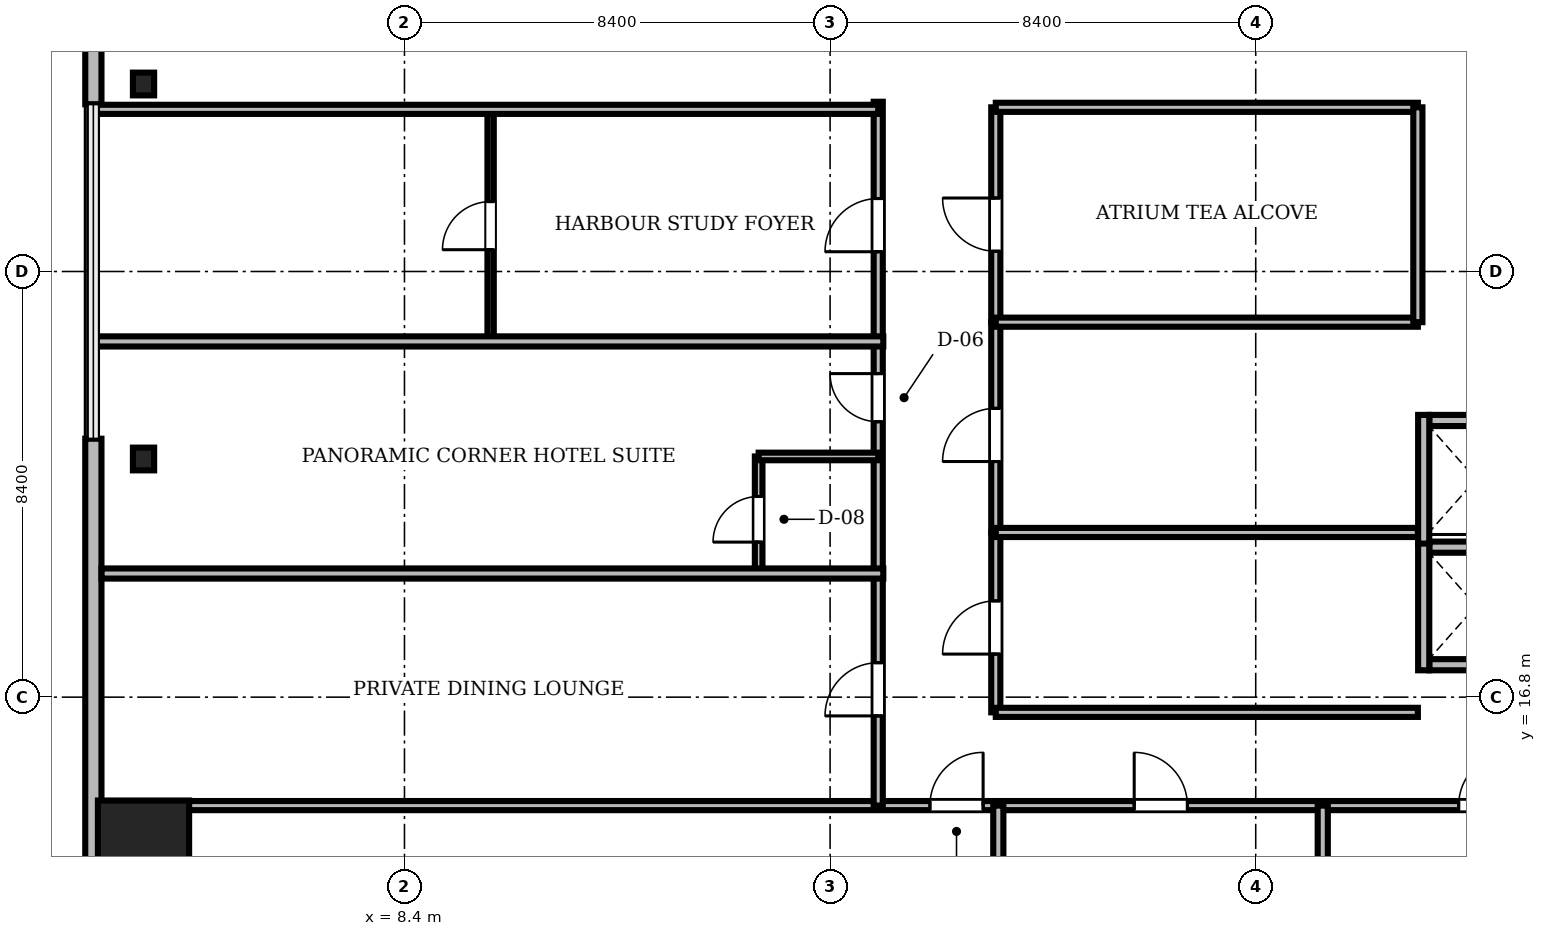
"""IFC4 building model, lengths in metres.
Left out: names, types, materials, properties, quantities, classifications, styles, units other than length and angle.
Written with IfcOpenShell. Run it as: python <this file> out.ifc"""

import sys

from ifc_helpers import new_model, si_unit, direction, frame, frame_2d, origin, origin_2d, place, context, subcontext, project, spatial, rectangle, i_section, extrude, source, transform, mapped, element, fill, save


model = new_model("IFC4")
c1 = context("Model", 3, precision=1e-05, world=origin(), true_north=direction((0.0, 1.0)))
c2 = subcontext(c1, "Body", "Model", "MODEL_VIEW")
j1 = project(units=[si_unit("LENGTHUNIT", "METRE"), si_unit("PLANEANGLEUNIT", "RADIAN")], contexts=[c1])
p1 = place(None, origin())
s1 = spatial("IfcSite", under=j1, at=p1, CompositionType="ELEMENT")
p2 = place(p1, origin())
s2 = spatial("IfcBuilding", under=s1, at=p2, CompositionType="ELEMENT")
p3 = place(p2, frame((0.0, 0.0, 34.9)))
s3 = spatial("IfcBuildingStorey", under=s2, at=p3, CompositionType="ELEMENT", Elevation=34.9)
m1 = source(origin(), c2, "Body", "SweptSolid", [
    extrude(rectangle(XDim=1.8, YDim=1.8, at=origin_2d()), origin(), (0.0, 0.0, 1.0), 3.41),
])
p4 = place(p3, frame((3.25, 13.86, 0.0), z_axis=(0.0, 0.0, 1.0), x_axis=(1.0, 0.0, 0.0)))
e1 = element("IfcColumn", 1, at=p4, inside=s3, PredefinedType="COLUMN", context=c2, shape_type="MappedRepresentation", body=[
    mapped(m1, transform((0.0, 0.0, 0.0), scale=1.0)),
])
m2 = source(origin(), c2, "Body", "SweptSolid", [
    extrude(i_section(OverallWidth=0.419, OverallDepth=0.449, WebThickness=0.031, FlangeThickness=0.048, FilletRadius=0.015, at=origin_2d()), origin(), (0.0, 0.0, 1.0), 3.41),
])
for number, where, z_axis, x_axis in (
    (2, (3.25, 28.9, 0.0), (0.0, 0.0, 1.0), (1.0, 0.0, 0.0)),
    (3, (3.25, 21.5, 0.0), (0.0, 0.0, 1.0), (1.0, 0.0, 0.0)),
):
    element("IfcColumn", number, at=place(p3, frame(where, z_axis=z_axis, x_axis=x_axis)), inside=s3, PredefinedType="COLUMN", context=c2, shape_type="MappedRepresentation", body=[
        mapped(m2, transform((0.0, 0.0, 0.0), scale=1.0)),
    ])
m3 = source(origin(), c2, "Body", "SweptSolid", [
    extrude(rectangle(XDim=15.6, YDim=0.32, at=frame_2d((7.8, 0.0))), origin(), (0.0, 0.0, 1.0), 3.41),
])
p5 = place(p3, frame((2.26, 44.1, 0.0), z_axis=(0.0, 0.0, 1.0), x_axis=(0.0, -1.0, 0.0)))
e4 = element("IfcWall", 4, at=p5, inside=s3, PredefinedType="SOLIDWALL", context=c2, shape_type="MappedRepresentation", body=[
    mapped(m3, transform((0.0, 0.0, 0.0), scale=1.0)),
])
m4 = source(origin(), c2, "Body", "SweptSolid", [
    extrude(rectangle(XDim=1.4, YDim=2.3, at=frame_2d((0.7, 1.15))), frame((0.0, 0.17, 0.0), z_axis=(0.0, -1.0, 0.0), x_axis=(1.0, 0.0, 0.0)), (0.0, 0.0, 1.0), 0.34),
])
p6 = place(p5, frame((9.61, 0.0, 0.0)))
e5 = element("IfcOpeningElement", 5, at=p6, cuts=e4, PredefinedType="OPENING", context=c2, shape_type="MappedRepresentation", body=[
    mapped(m4, transform((0.0, 0.0, 0.0), scale=1.0)),
])
m5 = source(origin(), c2, "Body", "SweptSolid", [
    extrude(rectangle(XDim=2.8, YDim=2.4, at=frame_2d((1.4, 1.2))), frame((0.0, 0.17, 0.0), z_axis=(0.0, -1.0, 0.0), x_axis=(1.0, 0.0, 0.0)), (0.0, 0.0, 1.0), 0.34),
])
p7 = place(p5, frame((2.705, 0.0, 0.72)))
e6 = element("IfcOpeningElement", 6, at=p7, cuts=e4, PredefinedType="OPENING", context=c2, shape_type="MappedRepresentation", body=[
    mapped(m5, transform((0.0, 0.0, 0.0), scale=1.0)),
])
m6 = source(origin(), c2, "Body", "SweptSolid", [
    extrude(rectangle(XDim=15.6, YDim=0.32, at=frame_2d((7.8, 0.0))), origin(), (0.0, 0.0, 1.0), 3.41),
])
p8 = place(p3, frame((2.26, 21.9, 0.0), z_axis=(0.0, 0.0, 1.0), x_axis=(0.0, -1.0, 0.0)))
e7 = element("IfcWall", 7, at=p8, inside=s3, PredefinedType="SOLIDWALL", context=c2, shape_type="MappedRepresentation", body=[
    mapped(m6, transform((0.0, 0.0, 0.0), scale=1.0)),
])
p9 = place(p8, frame((10.095, 0.0, 0.72)))
e8 = element("IfcOpeningElement", 8, at=p9, cuts=e7, PredefinedType="OPENING", context=c2, shape_type="MappedRepresentation", body=[
    mapped(m5, transform((0.0, 0.0, 0.0), scale=1.0)),
])
m7 = source(origin(), c2, "Body", "SweptSolid", [
    extrude(rectangle(XDim=1.85, YDim=0.22, at=frame_2d((0.925, 0.0))), origin(), (0.0, 0.0, 1.0), 3.41),
])
for number, where, z_axis, x_axis in (
    (9, (28.625, 17.44, 0.0), (0.0, 0.0, 1.0), (1.0, 0.0, 0.0)),
    (10, (28.625, 19.76, 0.0), (0.0, 0.0, 1.0), (1.0, 0.0, 0.0)),
):
    element("IfcWall", number, at=place(p3, frame(where, z_axis=z_axis, x_axis=x_axis)), inside=s3, PredefinedType="SOLIDWALL", context=c2, shape_type="MappedRepresentation", body=[
        mapped(m7, transform((0.0, 0.0, 0.0), scale=1.0)),
    ])
m8 = source(origin(), c2, "Body", "SweptSolid", [
    extrude(rectangle(XDim=2.54, YDim=0.22, at=frame_2d((1.27, 0.0))), origin(), (0.0, 0.0, 1.0), 3.41),
])
p10 = place(p3, frame((28.515, 17.33, 0.0), z_axis=(0.0, 0.0, 1.0), x_axis=(0.0, 1.0, 0.0)))
e11 = element("IfcWall", 11, at=p10, inside=s3, PredefinedType="SOLIDWALL", context=c2, shape_type="MappedRepresentation", body=[
    mapped(m8, transform((0.0, 0.0, 0.0), scale=1.0)),
])
p11 = place(p3, frame((28.625, 22.26, 0.0), z_axis=(0.0, 0.0, 1.0), x_axis=(1.0, 0.0, 0.0)))
e12 = element("IfcWall", 12, at=p11, inside=s3, PredefinedType="SOLIDWALL", context=c2, shape_type="MappedRepresentation", body=[
    mapped(m7, transform((0.0, 0.0, 0.0), scale=1.0)),
])
p12 = place(p3, frame((28.515, 19.83, 0.0), z_axis=(0.0, 0.0, 1.0), x_axis=(0.0, 1.0, 0.0)))
e13 = element("IfcWall", 13, at=p12, inside=s3, PredefinedType="SOLIDWALL", context=c2, shape_type="MappedRepresentation", body=[
    mapped(m8, transform((0.0, 0.0, 0.0), scale=1.0)),
])
m9 = source(origin(), c2, "Body", "SweptSolid", [
    extrude(rectangle(XDim=46.156, YDim=0.18, at=frame_2d((23.078, 0.0))), origin(), (0.0, 0.0, 1.0), 2.652),
])
p13 = place(p3, frame((2.422, 14.66, 0.0), z_axis=(0.0, 0.0, 1.0), x_axis=(1.0, 0.0, 0.0)))
e14 = element("IfcWall", 14, at=p13, inside=s3, PredefinedType="PARTITIONING", context=c2, shape_type="MappedRepresentation", body=[
    mapped(m9, transform((0.0, 0.0, 0.0), scale=1.0)),
])
m10 = source(origin(), c2, "Body", "SweptSolid", [
    extrude(rectangle(XDim=1.05, YDim=2.2, at=frame_2d((0.525, 1.1))), frame((0.0, 0.1, 0.0), z_axis=(0.0, -1.0, 0.0), x_axis=(1.0, 0.0, 0.0)), (0.0, 0.0, 1.0), 0.2),
])
p14 = place(p13, frame((16.348, 0.0, 0.0)))
e15 = element("IfcOpeningElement", 15, at=p14, cuts=e14, PredefinedType="OPENING", context=c2, shape_type="MappedRepresentation", body=[
    mapped(m10, transform((0.0, 0.0, 0.0), scale=1.0)),
])
p15 = place(p13, frame((20.38, 0.0, 0.0)))
e16 = element("IfcOpeningElement", 16, at=p15, cuts=e14, PredefinedType="OPENING", context=c2, shape_type="MappedRepresentation", body=[
    mapped(m10, transform((0.0, 0.0, 0.0), scale=1.0)),
])
p16 = place(p13, frame((26.783, 0.0, 0.0)))
e17 = element("IfcOpeningElement", 17, at=p16, cuts=e14, PredefinedType="OPENING", context=c2, shape_type="MappedRepresentation", body=[
    mapped(m10, transform((0.0, 0.0, 0.0), scale=1.0)),
])
p17 = place(p13, frame((33.186, 0.0, 0.0)))
e18 = element("IfcOpeningElement", 18, at=p17, cuts=e14, PredefinedType="OPENING", context=c2, shape_type="MappedRepresentation", body=[
    mapped(m10, transform((0.0, 0.0, 0.0), scale=1.0)),
])
p18 = place(p13, frame((40.998, 0.0, 0.0)))
e19 = element("IfcOpeningElement", 19, at=p18, cuts=e14, PredefinedType="OPENING", context=c2, shape_type="MappedRepresentation", body=[
    mapped(m10, transform((0.0, 0.0, 0.0), scale=1.0)),
])
m11 = source(origin(), c2, "Body", "SweptSolid", [
    extrude(rectangle(XDim=13.89, YDim=0.18, at=frame_2d((6.945, 0.0))), origin(), (0.0, 0.0, 1.0), 2.802),
])
p19 = place(p3, frame((17.75, 14.66, 0.0), z_axis=(0.0, 0.0, 1.0), x_axis=(0.0, 1.0, 0.0)))
e20 = element("IfcWall", 20, at=p19, inside=s3, PredefinedType="PARTITIONING", context=c2, shape_type="MappedRepresentation", body=[
    mapped(m11, transform((0.0, 0.0, 0.0), scale=1.0)),
])
p20 = place(p19, frame((1.77, 0.0, 0.0)))
e21 = element("IfcOpeningElement", 21, at=p20, cuts=e20, PredefinedType="OPENING", context=c2, shape_type="MappedRepresentation", body=[
    mapped(m10, transform((0.0, 0.0, 0.0), scale=1.0)),
])
m12 = source(origin(), c2, "Body", "SweptSolid", [
    extrude(rectangle(XDim=0.95, YDim=2.15, at=frame_2d((0.475, 1.075))), frame((0.0, 0.1, 0.0), z_axis=(0.0, -1.0, 0.0), x_axis=(1.0, 0.0, 0.0)), (0.0, 0.0, 1.0), 0.2),
])
p21 = place(p19, frame((7.575, 0.0, 0.0)))
e22 = element("IfcOpeningElement", 22, at=p21, cuts=e20, PredefinedType="OPENING", context=c2, shape_type="MappedRepresentation", body=[
    mapped(m12, transform((0.0, 0.0, 0.0), scale=1.0)),
])
p22 = place(p19, frame((10.93, 0.0, 0.0)))
e23 = element("IfcOpeningElement", 23, at=p22, cuts=e20, PredefinedType="OPENING", context=c2, shape_type="MappedRepresentation", body=[
    mapped(m10, transform((0.0, 0.0, 0.0), scale=1.0)),
])
m13 = source(origin(), c2, "Body", "SweptSolid", [
    extrude(rectangle(XDim=4.58, YDim=0.125, at=frame_2d((2.29, 0.0))), origin(), (0.0, 0.0, 1.0), 2.802),
])
p23 = place(p3, frame((10.1, 23.82, 0.0), z_axis=(0.0, 0.0, 1.0), x_axis=(0.0, 1.0, 0.0)))
e24 = element("IfcWall", 24, at=p23, inside=s3, PredefinedType="PARTITIONING", context=c2, shape_type="MappedRepresentation", body=[
    mapped(m13, transform((0.0, 0.0, 0.0), scale=1.0)),
])
m14 = source(origin(), c2, "Body", "SweptSolid", [
    extrude(rectangle(XDim=0.95, YDim=2.15, at=frame_2d((0.475, 1.075))), frame((0.0, 0.073, 0.0), z_axis=(0.0, -1.0, 0.0), x_axis=(1.0, 0.0, 0.0)), (0.0, 0.0, 1.0), 0.145),
])
p24 = place(p23, frame((1.81, 0.0, 0.0)))
e25 = element("IfcOpeningElement", 25, at=p24, cuts=e24, PredefinedType="OPENING", context=c2, shape_type="MappedRepresentation", body=[
    mapped(m14, transform((0.0, 0.0, 0.0), scale=1.0)),
])
m15 = source(origin(), c2, "Body", "SweptSolid", [
    extrude(rectangle(XDim=4.24, YDim=0.18, at=frame_2d((2.12, 0.0))), origin(), (0.0, 0.0, 1.0), 2.802),
])
p25 = place(p3, frame((20.07, 24.2, 0.0), z_axis=(0.0, 0.0, 1.0), x_axis=(0.0, 1.0, 0.0)))
e26 = element("IfcWall", 26, at=p25, inside=s3, PredefinedType="PARTITIONING", context=c2, shape_type="MappedRepresentation", body=[
    mapped(m15, transform((0.0, 0.0, 0.0), scale=1.0)),
])
p26 = place(p25, frame((1.4, 0.0, 0.0)))
e27 = element("IfcOpeningElement", 27, at=p26, cuts=e26, PredefinedType="OPENING", context=c2, shape_type="MappedRepresentation", body=[
    mapped(m10, transform((0.0, 0.0, 0.0), scale=1.0)),
])
m16 = source(origin(), c2, "Body", "SweptSolid", [
    extrude(rectangle(XDim=4.15, YDim=0.18, at=frame_2d((2.075, 0.0))), origin(), (0.0, 0.0, 1.0), 3.042),
])
p27 = place(p3, frame((20.07, 20.05, 0.0), z_axis=(0.0, 0.0, 1.0), x_axis=(0.0, 1.0, 0.0)))
e28 = element("IfcWall", 28, at=p27, inside=s3, PredefinedType="PARTITIONING", context=c2, shape_type="MappedRepresentation", body=[
    mapped(m16, transform((0.0, 0.0, 0.0), scale=1.0)),
])
p28 = place(p27, frame((1.4, 0.0, 0.0)))
e29 = element("IfcOpeningElement", 29, at=p28, cuts=e28, PredefinedType="OPENING", context=c2, shape_type="MappedRepresentation", body=[
    mapped(m10, transform((0.0, 0.0, 0.0), scale=1.0)),
])
m17 = source(origin(), c2, "Body", "SweptSolid", [
    extrude(rectangle(XDim=3.55, YDim=0.18, at=frame_2d((1.775, 0.0))), origin(), (0.0, 0.0, 1.0), 2.802),
])
p29 = place(p3, frame((20.07, 16.5, 0.0), z_axis=(0.0, 0.0, 1.0), x_axis=(0.0, 1.0, 0.0)))
e30 = element("IfcWall", 30, at=p29, inside=s3, PredefinedType="PARTITIONING", context=c2, shape_type="MappedRepresentation", body=[
    mapped(m17, transform((0.0, 0.0, 0.0), scale=1.0)),
])
p30 = place(p29, frame((1.15, 0.0, 0.0)))
e31 = element("IfcOpeningElement", 31, at=p30, cuts=e30, PredefinedType="OPENING", context=c2, shape_type="MappedRepresentation", body=[
    mapped(m10, transform((0.0, 0.0, 0.0), scale=1.0)),
])
m18 = source(origin(), c2, "Body", "SweptSolid", [
    extrude(rectangle(XDim=2.29, YDim=0.15, at=frame_2d((1.145, 0.0))), origin(), (0.0, 0.0, 1.0), 2.802),
])
p31 = place(p3, frame((15.39, 19.26, 0.0), z_axis=(0.0, 0.0, 1.0), x_axis=(0.0, 1.0, 0.0)))
e32 = element("IfcWall", 32, at=p31, inside=s3, PredefinedType="PARTITIONING", context=c2, shape_type="MappedRepresentation", body=[
    mapped(m18, transform((0.0, 0.0, 0.0), scale=1.0)),
])
m19 = source(origin(), c2, "Body", "SweptSolid", [
    extrude(rectangle(XDim=0.9, YDim=2.1, at=frame_2d((0.45, 1.05))), frame((0.0, 0.085, 0.0), z_axis=(0.0, -1.0, 0.0), x_axis=(1.0, 0.0, 0.0)), (0.0, 0.0, 1.0), 0.17),
])
p32 = place(p31, frame((0.6, 0.0, 0.0)))
e33 = element("IfcOpeningElement", 33, at=p32, cuts=e32, PredefinedType="OPENING", context=c2, shape_type="MappedRepresentation", body=[
    mapped(m19, transform((0.0, 0.0, 0.0), scale=1.0)),
])
m20 = source(origin(), c2, "Body", "SweptSolid", [
    extrude(rectangle(XDim=15.428, YDim=0.2, at=frame_2d((7.714, 0.0))), origin(), (0.0, 0.0, 1.0), 2.652),
])
p33 = place(p3, frame((2.422, 19.24, 0.0), z_axis=(0.0, 0.0, 1.0), x_axis=(1.0, 0.0, 0.0)))
e34 = element("IfcWall", 34, at=p33, inside=s3, PredefinedType="PARTITIONING", context=c2, shape_type="MappedRepresentation", body=[
    mapped(m20, transform((0.0, 0.0, 0.0), scale=1.0)),
])
m21 = source(origin(), c2, "Body", "SweptSolid", [
    extrude(rectangle(XDim=15.62, YDim=0.2, at=frame_2d((7.81, 0.0))), origin(), (0.0, 0.0, 1.0), 2.652),
])
p34 = place(p3, frame((2.23, 23.82, 0.0), z_axis=(0.0, 0.0, 1.0), x_axis=(1.0, 0.0, 0.0)))
e35 = element("IfcWall", 35, at=p34, inside=s3, PredefinedType="PARTITIONING", context=c2, shape_type="MappedRepresentation", body=[
    mapped(m21, transform((0.0, 0.0, 0.0), scale=1.0)),
])
m22 = source(origin(), c2, "Body", "SweptSolid", [
    extrude(rectangle(XDim=15.52, YDim=0.18, at=frame_2d((7.76, 0.0))), origin(), (0.0, 0.0, 1.0), 2.652),
])
p35 = place(p3, frame((2.23, 28.4, 0.0), z_axis=(0.0, 0.0, 1.0), x_axis=(1.0, 0.0, 0.0)))
e36 = element("IfcWall", 36, at=p35, inside=s3, PredefinedType="PARTITIONING", context=c2, shape_type="MappedRepresentation", body=[
    mapped(m22, transform((0.0, 0.0, 0.0), scale=1.0)),
])
m23 = source(origin(), c2, "Body", "SweptSolid", [
    extrude(rectangle(XDim=12.538, YDim=0.2, at=frame_2d((6.269, 0.0))), origin(), (0.0, 0.0, 1.0), 2.652),
])
p36 = place(p3, frame((20.12, 2.122, 0.0), z_axis=(0.0, 0.0, 1.0), x_axis=(0.0, 1.0, 0.0)))
e37 = element("IfcWall", 37, at=p36, inside=s3, PredefinedType="PARTITIONING", context=c2, shape_type="MappedRepresentation", body=[
    mapped(m23, transform((0.0, 0.0, 0.0), scale=1.0)),
])
m24 = source(origin(), c2, "Body", "SweptSolid", [
    extrude(rectangle(XDim=12.73, YDim=0.2, at=frame_2d((6.365, 0.0))), origin(), (0.0, 0.0, 1.0), 2.652),
])
p37 = place(p3, frame((26.523, 1.93, 0.0), z_axis=(0.0, 0.0, 1.0), x_axis=(0.0, 1.0, 0.0)))
e38 = element("IfcWall", 38, at=p37, inside=s3, PredefinedType="PARTITIONING", context=c2, shape_type="MappedRepresentation", body=[
    mapped(m24, transform((0.0, 0.0, 0.0), scale=1.0)),
])
m25 = source(origin(), c2, "Body", "SweptSolid", [
    extrude(rectangle(XDim=8.33, YDim=0.18, at=frame_2d((4.165, 0.0))), origin(), (0.0, 0.0, 1.0), 2.802),
])
p38 = place(p3, frame((20.07, 16.5, 0.0), z_axis=(0.0, 0.0, 1.0), x_axis=(1.0, 0.0, 0.0)))
e39 = element("IfcWall", 39, at=p38, inside=s3, PredefinedType="PARTITIONING", context=c2, shape_type="MappedRepresentation", body=[
    mapped(m25, transform((0.0, 0.0, 0.0), scale=1.0)),
])
m26 = source(origin(), c2, "Body", "SweptSolid", [
    extrude(rectangle(XDim=8.33, YDim=0.18, at=frame_2d((4.165, 0.0))), origin(), (0.0, 0.0, 1.0), 3.41),
])
for number, where, z_axis, x_axis in (
    (40, (20.07, 20.05, 0.0), (0.0, 0.0, 1.0), (1.0, 0.0, 0.0)),
    (41, (20.07, 24.2, 0.0), (0.0, 0.0, 1.0), (1.0, 0.0, 0.0)),
    (42, (20.07, 28.44, 0.0), (0.0, 0.0, 1.0), (1.0, 0.0, 0.0)),
):
    element("IfcWall", number, at=place(p3, frame(where, z_axis=z_axis, x_axis=x_axis)), inside=s3, PredefinedType="PARTITIONING", context=c2, shape_type="MappedRepresentation", body=[
        mapped(m26, transform((0.0, 0.0, 0.0), scale=1.0)),
    ])
p39 = place(p3, frame((28.4, 24.2, 0.0), z_axis=(0.0, 0.0, 1.0), x_axis=(0.0, 1.0, 0.0)))
e43 = element("IfcWall", 43, at=p39, inside=s3, PredefinedType="PARTITIONING", context=c2, shape_type="MappedRepresentation", body=[
    mapped(m15, transform((0.0, 0.0, 0.0), scale=1.0)),
])
m27 = source(origin(), c2, "Body", "SweptSolid", [
    extrude(rectangle(XDim=2.36, YDim=0.15, at=frame_2d((1.18, 0.0))), origin(), (0.0, 0.0, 1.0), 3.41),
])
p40 = place(p3, frame((15.39, 21.55, 0.0), z_axis=(0.0, 0.0, 1.0), x_axis=(1.0, 0.0, 0.0)))
e44 = element("IfcWall", 44, at=p40, inside=s3, PredefinedType="PARTITIONING", context=c2, shape_type="MappedRepresentation", body=[
    mapped(m27, transform((0.0, 0.0, 0.0), scale=1.0)),
])
m28 = source(origin(), c2, "Body", "SweptSolid", [
    extrude(rectangle(XDim=1.05, YDim=2.2, at=frame_2d((0.525, 1.1))), frame((0.0, 0.025, 0.0), z_axis=(0.0, -1.0, 0.0), x_axis=(1.0, 0.0, 0.0)), (0.0, 0.0, 1.0), 0.05),
])
p41 = place(p14, origin())
e45 = element("IfcDoor", 45, at=p41, inside=s3, OperationType="SINGLE_SWING_RIGHT", PredefinedType="DOOR", context=c2, shape_type="MappedRepresentation", body=[
    mapped(m28, transform((0.0, 0.0, 0.0), scale=1.0)),
])
fill(e15, e45)
p42 = place(p15, origin())
e46 = element("IfcDoor", 46, at=p42, inside=s3, OperationType="SINGLE_SWING_LEFT", PredefinedType="DOOR", context=c2, shape_type="MappedRepresentation", body=[
    mapped(m28, transform((0.0, 0.0, 0.0), scale=1.0)),
])
fill(e16, e46)
p43 = place(p16, origin())
e47 = element("IfcDoor", 47, at=p43, inside=s3, OperationType="SINGLE_SWING_RIGHT", PredefinedType="DOOR", context=c2, shape_type="MappedRepresentation", body=[
    mapped(m28, transform((0.0, 0.0, 0.0), scale=1.0)),
])
fill(e17, e47)
p44 = place(p20, origin())
e48 = element("IfcDoor", 48, at=p44, inside=s3, OperationType="SINGLE_SWING_LEFT", PredefinedType="DOOR", context=c2, shape_type="MappedRepresentation", body=[
    mapped(m28, transform((0.0, 0.0, 0.0), scale=1.0)),
])
fill(e21, e48)
m29 = source(origin(), c2, "Body", "SweptSolid", [
    extrude(rectangle(XDim=0.95, YDim=2.15, at=frame_2d((0.475, 1.075))), frame((0.0, 0.025, 0.0), z_axis=(0.0, -1.0, 0.0), x_axis=(1.0, 0.0, 0.0)), (0.0, 0.0, 1.0), 0.05),
])
p45 = place(p21, origin())
e49 = element("IfcDoor", 49, at=p45, inside=s3, OperationType="SINGLE_SWING_RIGHT", PredefinedType="DOOR", context=c2, shape_type="MappedRepresentation", body=[
    mapped(m29, transform((0.0, 0.0, 0.0), scale=1.0)),
])
fill(e22, e49)
p46 = place(p22, origin())
e50 = element("IfcDoor", 50, at=p46, inside=s3, OperationType="SINGLE_SWING_LEFT", PredefinedType="DOOR", context=c2, shape_type="MappedRepresentation", body=[
    mapped(m28, transform((0.0, 0.0, 0.0), scale=1.0)),
])
fill(e23, e50)
p47 = place(p24, origin())
e51 = element("IfcDoor", 51, at=p47, inside=s3, OperationType="SINGLE_SWING_LEFT", PredefinedType="DOOR", context=c2, shape_type="MappedRepresentation", body=[
    mapped(m29, transform((0.0, 0.0, 0.0), scale=1.0)),
])
fill(e25, e51)
p48 = place(p26, origin())
e52 = element("IfcDoor", 52, at=p48, inside=s3, OperationType="SINGLE_SWING_RIGHT", PredefinedType="DOOR", context=c2, shape_type="MappedRepresentation", body=[
    mapped(m28, transform((0.0, 0.0, 0.0), scale=1.0)),
])
fill(e27, e52)
p49 = place(p28, origin())
e53 = element("IfcDoor", 53, at=p49, inside=s3, OperationType="SINGLE_SWING_LEFT", PredefinedType="DOOR", context=c2, shape_type="MappedRepresentation", body=[
    mapped(m28, transform((0.0, 0.0, 0.0), scale=1.0)),
])
fill(e29, e53)
p50 = place(p30, origin())
e54 = element("IfcDoor", 54, at=p50, inside=s3, OperationType="SINGLE_SWING_LEFT", PredefinedType="DOOR", context=c2, shape_type="MappedRepresentation", body=[
    mapped(m28, transform((0.0, 0.0, 0.0), scale=1.0)),
])
fill(e31, e54)
m30 = source(origin(), c2, "Body", "SweptSolid", [
    extrude(rectangle(XDim=0.9, YDim=2.1, at=frame_2d((0.45, 1.05))), frame((0.0, 0.025, 0.0), z_axis=(0.0, -1.0, 0.0), x_axis=(1.0, 0.0, 0.0)), (0.0, 0.0, 1.0), 0.05),
])
p51 = place(p32, origin())
e55 = element("IfcDoor", 55, at=p51, inside=s3, OperationType="SINGLE_SWING_LEFT", PredefinedType="DOOR", context=c2, shape_type="MappedRepresentation", body=[
    mapped(m30, transform((0.0, 0.0, 0.0), scale=1.0)),
])
fill(e33, e55)
save(model, sys.argv[1])
